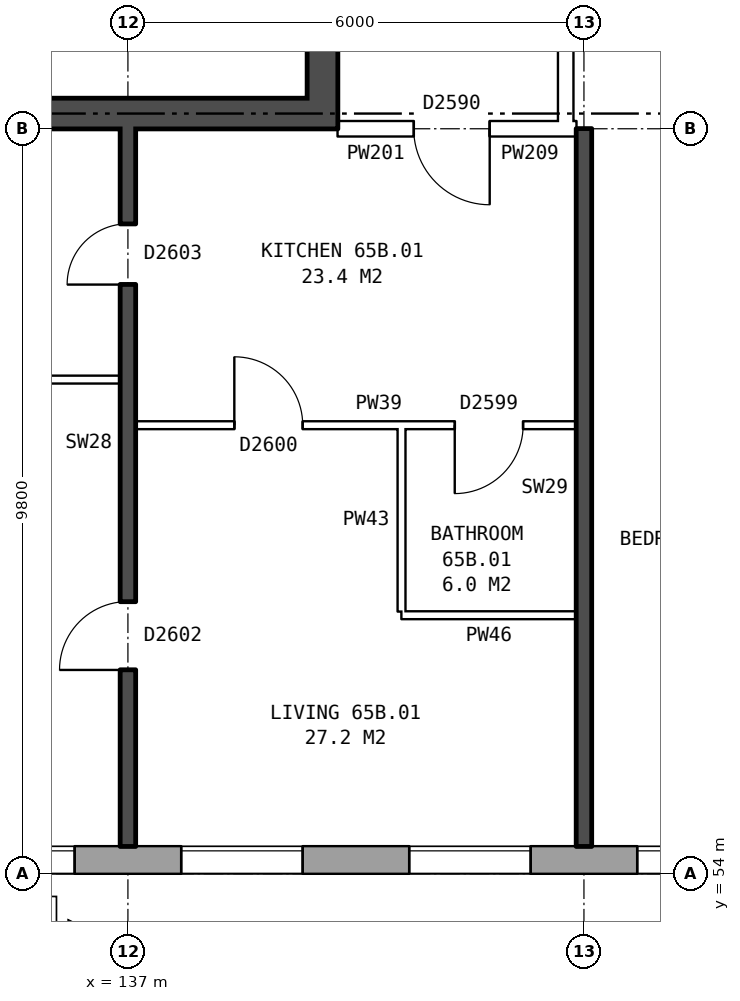
"""IFC4 building model, lengths in metres.
Left out: names, types, materials, properties, quantities, classifications, styles, units other than length and angle.
Written with IfcOpenShell. Run it as: python <this file> out.ifc"""

import sys

from ifc_helpers import new_model, si_unit, direction, frame, frame_2d, origin, place, context, subcontext, project, spatial, rectangle, extrude, element, fill, save


model = new_model("IFC4")
c1 = context("Model", 3, precision=1e-05, world=origin(), true_north=direction((0.0, 1.0)))
c2 = subcontext(c1, "Body", "Model", "MODEL_VIEW")
j1 = project(units=[si_unit("LENGTHUNIT", "METRE"), si_unit("PLANEANGLEUNIT", "RADIAN")], contexts=[c1])
p1 = place(None, origin())
s1 = spatial("IfcSite", under=j1, at=p1, CompositionType="ELEMENT")
p2 = place(p1, origin())
s2 = spatial("IfcBuilding", under=s1, at=p2, CompositionType="ELEMENT")
p3 = place(p2, frame((0.0, 0.0, 230.7)))
s3 = spatial("IfcBuildingStorey", under=s2, at=p3, CompositionType="ELEMENT", Elevation=230.7)
p4 = place(p3, frame((132.05, 54.18, 0.0), z_axis=(0.0, 0.0, 1.0), x_axis=(1.0, 0.0, 0.0)))
e1 = element("IfcWall", 1, at=p4, inside=s3, PredefinedType="STANDARD", context=c2, shape_type="SweptSolid", body=[
    extrude(rectangle(XDim=33.875, YDim=0.36, at=frame_2d((16.938, 0.0))), origin(), (0.0, 0.0, 1.0), 2.85),
])
p5 = place(p4, frame((2.65, 0.0, 0.8)))
e2 = element("IfcOpeningElement", 2, at=p5, cuts=e1, PredefinedType="OPENING", context=c2, shape_type="SweptSolid", body=[
    extrude(rectangle(XDim=1.6, YDim=1.8, at=frame_2d((0.8, 0.9))), frame((0.0, 0.19, 0.0), z_axis=(0.0, -1.0, 0.0), x_axis=(1.0, 0.0, 0.0)), (0.0, 0.0, 1.0), 0.38),
])
p6 = place(p4, frame((5.65, 0.0, 0.8)))
e3 = element("IfcOpeningElement", 3, at=p6, cuts=e1, PredefinedType="OPENING", context=c2, shape_type="SweptSolid", body=[
    extrude(rectangle(XDim=1.6, YDim=1.8, at=frame_2d((0.8, 0.9))), frame((0.0, 0.19, 0.0), z_axis=(0.0, -1.0, 0.0), x_axis=(1.0, 0.0, 0.0)), (0.0, 0.0, 1.0), 0.38),
])
p7 = place(p4, frame((8.65, 0.0, 0.8)))
e4 = element("IfcOpeningElement", 4, at=p7, cuts=e1, PredefinedType="OPENING", context=c2, shape_type="SweptSolid", body=[
    extrude(rectangle(XDim=1.6, YDim=1.8, at=frame_2d((0.8, 0.9))), frame((0.0, 0.19, 0.0), z_axis=(0.0, -1.0, 0.0), x_axis=(1.0, 0.0, 0.0)), (0.0, 0.0, 1.0), 0.38),
])
p8 = place(p4, frame((11.65, 0.0, 0.8)))
e5 = element("IfcOpeningElement", 5, at=p8, cuts=e1, PredefinedType="OPENING", context=c2, shape_type="SweptSolid", body=[
    extrude(rectangle(XDim=1.6, YDim=1.8, at=frame_2d((0.8, 0.9))), frame((0.0, 0.19, 0.0), z_axis=(0.0, -1.0, 0.0), x_axis=(1.0, 0.0, 0.0)), (0.0, 0.0, 1.0), 0.38),
])
p9 = place(p4, frame((14.1, 0.0, 1.25)))
e6 = element("IfcOpeningElement", 6, at=p9, cuts=e1, PredefinedType="OPENING", context=c2, shape_type="SweptSolid", body=[
    extrude(rectangle(XDim=0.8, YDim=1.2, at=frame_2d((0.4, 0.6))), frame((0.0, 0.19, 0.0), z_axis=(0.0, -1.0, 0.0), x_axis=(1.0, 0.0, 0.0)), (0.0, 0.0, 1.0), 0.38),
])
p10 = place(p4, frame((17.65, 0.0, 0.8)))
e7 = element("IfcOpeningElement", 7, at=p10, cuts=e1, PredefinedType="OPENING", context=c2, shape_type="SweptSolid", body=[
    extrude(rectangle(XDim=1.6, YDim=1.8, at=frame_2d((0.8, 0.9))), frame((0.0, 0.19, 0.0), z_axis=(0.0, -1.0, 0.0), x_axis=(1.0, 0.0, 0.0)), (0.0, 0.0, 1.0), 0.38),
])
p11 = place(p4, frame((21.25, 0.0, 0.8)))
e8 = element("IfcOpeningElement", 8, at=p11, cuts=e1, PredefinedType="OPENING", context=c2, shape_type="SweptSolid", body=[
    extrude(rectangle(XDim=1.4, YDim=1.8, at=frame_2d((0.7, 0.9))), frame((0.0, 0.19, 0.0), z_axis=(0.0, -1.0, 0.0), x_axis=(1.0, 0.0, 0.0)), (0.0, 0.0, 1.0), 0.38),
])
p12 = place(p4, frame((23.65, 0.0, 0.8)))
e9 = element("IfcOpeningElement", 9, at=p12, cuts=e1, PredefinedType="OPENING", context=c2, shape_type="SweptSolid", body=[
    extrude(rectangle(XDim=1.6, YDim=1.8, at=frame_2d((0.8, 0.9))), frame((0.0, 0.19, 0.0), z_axis=(0.0, -1.0, 0.0), x_axis=(1.0, 0.0, 0.0)), (0.0, 0.0, 1.0), 0.38),
])
p13 = place(p4, frame((26.65, 0.0, 0.8)))
e10 = element("IfcOpeningElement", 10, at=p13, cuts=e1, PredefinedType="OPENING", context=c2, shape_type="SweptSolid", body=[
    extrude(rectangle(XDim=1.6, YDim=1.8, at=frame_2d((0.8, 0.9))), frame((0.0, 0.19, 0.0), z_axis=(0.0, -1.0, 0.0), x_axis=(1.0, 0.0, 0.0)), (0.0, 0.0, 1.0), 0.38),
])
p14 = place(p4, frame((29.65, 0.0, 0.8)))
e11 = element("IfcOpeningElement", 11, at=p14, cuts=e1, PredefinedType="OPENING", context=c2, shape_type="SweptSolid", body=[
    extrude(rectangle(XDim=1.6, YDim=1.8, at=frame_2d((0.8, 0.9))), frame((0.0, 0.19, 0.0), z_axis=(0.0, -1.0, 0.0), x_axis=(1.0, 0.0, 0.0)), (0.0, 0.0, 1.0), 0.38),
])
p15 = place(p4, frame((16.1, 0.0, 0.15)))
e12 = element("IfcOpeningElement", 12, at=p15, cuts=e1, PredefinedType="OPENING", context=c2, shape_type="SweptSolid", body=[
    extrude(rectangle(XDim=0.6, YDim=1.2, at=frame_2d((0.3, 0.6))), frame((0.0, 0.19, 0.0), z_axis=(0.0, -1.0, 0.0), x_axis=(1.0, 0.0, 0.0)), (0.0, 0.0, 1.0), 0.38),
])
p16 = place(p3, frame((139.56, 63.8, 0.0), z_axis=(0.0, 0.0, 1.0), x_axis=(0.0, 1.0, 0.0)))
e13 = element("IfcWall", 13, at=p16, inside=s3, PredefinedType="SHEAR", context=c2, shape_type="SweptSolid", body=[
    extrude(rectangle(XDim=12.4, YDim=0.4, at=frame_2d((6.2, 0.0))), origin(), (0.0, 0.0, 1.0), 2.85),
])
p17 = place(p16, frame((1.325, 0.0, 0.0)))
e14 = element("IfcOpeningElement", 14, at=p17, cuts=e13, PredefinedType="OPENING", context=c2, shape_type="SweptSolid", body=[
    extrude(rectangle(XDim=1.1, YDim=2.1, at=frame_2d((0.55, 1.05))), frame((0.0, 0.21, 0.0), z_axis=(0.0, -1.0, 0.0), x_axis=(1.0, 0.0, 0.0)), (0.0, 0.0, 1.0), 0.42),
])
p18 = place(p16, frame((3.6, 0.0, 0.0)))
e15 = element("IfcOpeningElement", 15, at=p18, cuts=e13, PredefinedType="OPENING", context=c2, shape_type="SweptSolid", body=[
    extrude(rectangle(XDim=1.1, YDim=2.1, at=frame_2d((0.55, 1.05))), frame((0.0, 0.21, 0.0), z_axis=(0.0, -1.0, 0.0), x_axis=(1.0, 0.0, 0.0)), (0.0, 0.0, 1.0), 0.42),
])
p19 = place(p16, frame((5.8, 0.0, 0.0)))
e16 = element("IfcOpeningElement", 16, at=p19, cuts=e13, PredefinedType="OPENING", context=c2, shape_type="SweptSolid", body=[
    extrude(rectangle(XDim=1.1, YDim=2.1, at=frame_2d((0.55, 1.05))), frame((0.0, 0.21, 0.0), z_axis=(0.0, -1.0, 0.0), x_axis=(1.0, 0.0, 0.0)), (0.0, 0.0, 1.0), 0.42),
])
p20 = place(p16, frame((9.9, 0.0, 0.0)))
e17 = element("IfcOpeningElement", 17, at=p20, cuts=e13, PredefinedType="OPENING", context=c2, shape_type="SweptSolid", body=[
    extrude(rectangle(XDim=1.1, YDim=2.1, at=frame_2d((0.55, 1.05))), frame((0.0, 0.21, 0.0), z_axis=(0.0, -1.0, 0.0), x_axis=(1.0, 0.0, 0.0)), (0.0, 0.0, 1.0), 0.42),
])
p21 = place(p16, frame((8.125, 0.0, 0.0)))
e18 = element("IfcOpeningElement", 18, at=p21, cuts=e13, PredefinedType="OPENING", context=c2, shape_type="SweptSolid", body=[
    extrude(rectangle(XDim=0.85, YDim=2.1, at=frame_2d((0.425, 1.05))), frame((0.0, 0.21, 0.0), z_axis=(0.0, -1.0, 0.0), x_axis=(1.0, 0.0, 0.0)), (0.0, 0.0, 1.0), 0.42),
])
p22 = place(p3, frame((139.36, 64.0, 0.0), z_axis=(0.0, 0.0, 1.0), x_axis=(-1.0, 0.0, 0.0)))
e19 = element("IfcWall", 19, at=p22, inside=s3, PredefinedType="SHEAR", context=c2, shape_type="SweptSolid", body=[
    extrude(rectangle(XDim=7.6, YDim=0.4, at=frame_2d((3.8, 0.0))), origin(), (0.0, 0.0, 1.0), 2.85),
])
p23 = place(p3, frame((142.76, 63.9, 0.0), z_axis=(0.0, 0.0, 1.0), x_axis=(0.0, 1.0, 0.0)))
e20 = element("IfcWall", 20, at=p23, inside=s3, PredefinedType="PARTITIONING", context=c2, shape_type="SweptSolid", body=[
    extrude(rectangle(XDim=12.2, YDim=0.2, at=frame_2d((6.1, 0.0))), origin(), (0.0, 0.0, 1.0), 2.85),
])
p24 = place(p23, frame((5.1, 0.0, 0.0)))
e21 = element("IfcOpeningElement", 21, at=p24, cuts=e20, PredefinedType="OPENING", context=c2, shape_type="SweptSolid", body=[
    extrude(rectangle(XDim=2.0, YDim=2.1, at=frame_2d((1.0, 1.05))), frame((0.0, 0.11, 0.0), z_axis=(0.0, -1.0, 0.0), x_axis=(1.0, 0.0, 0.0)), (0.0, 0.0, 1.0), 0.22),
])
p25 = place(p3, frame((140.6, 57.4, 0.0), z_axis=(0.0, 0.0, 1.0), x_axis=(1.0, 0.0, 0.0)))
e22 = element("IfcWall", 22, at=p25, inside=s3, PredefinedType="PARTITIONING", context=c2, shape_type="SweptSolid", body=[
    extrude(rectangle(XDim=2.3, YDim=0.1, at=frame_2d((1.15, 0.0))), origin(), (0.0, 0.0, 1.0), 2.85),
])
p26 = place(p3, frame((137.1, 59.9, 0.0), z_axis=(0.0, 0.0, 1.0), x_axis=(1.0, 0.0, 0.0)))
e23 = element("IfcWall", 23, at=p26, inside=s3, PredefinedType="PARTITIONING", context=c2, shape_type="SweptSolid", body=[
    extrude(rectangle(XDim=5.8, YDim=0.1, at=frame_2d((2.9, 0.0))), origin(), (0.0, 0.0, 1.0), 2.85),
])
p27 = place(p26, frame((1.3, 0.0, 0.0)))
e24 = element("IfcOpeningElement", 24, at=p27, cuts=e23, PredefinedType="OPENING", context=c2, shape_type="SweptSolid", body=[
    extrude(rectangle(XDim=0.9, YDim=2.1, at=frame_2d((0.45, 1.05))), frame((0.0, 0.06, 0.0), z_axis=(0.0, -1.0, 0.0), x_axis=(1.0, 0.0, 0.0)), (0.0, 0.0, 1.0), 0.12),
])
p28 = place(p26, frame((4.2, 0.0, 0.0)))
e25 = element("IfcOpeningElement", 25, at=p28, cuts=e23, PredefinedType="OPENING", context=c2, shape_type="SweptSolid", body=[
    extrude(rectangle(XDim=0.9, YDim=2.1, at=frame_2d((0.45, 1.05))), frame((0.0, 0.06, 0.0), z_axis=(0.0, -1.0, 0.0), x_axis=(1.0, 0.0, 0.0)), (0.0, 0.0, 1.0), 0.12),
])
p29 = place(p3, frame((131.1, 60.5, 0.0), z_axis=(0.0, 0.0, 1.0), x_axis=(1.0, 0.0, 0.0)))
e26 = element("IfcWall", 26, at=p29, inside=s3, PredefinedType="PARTITIONING", context=c2, shape_type="SweptSolid", body=[
    extrude(rectangle(XDim=5.8, YDim=0.1, at=frame_2d((2.9, 0.0))), origin(), (0.0, 0.0, 1.0), 2.85),
])
p30 = place(p3, frame((139.76, 63.8, 0.0), z_axis=(0.0, 0.0, 1.0), x_axis=(1.0, 0.0, 0.0)))
e27 = element("IfcWall", 27, at=p30, inside=s3, PredefinedType="PARTITIONING", context=c2, shape_type="SweptSolid", body=[
    extrude(rectangle(XDim=3.0, YDim=0.2, at=frame_2d((1.5, 0.0))), origin(), (0.0, 0.0, 1.0), 2.85),
])
p31 = place(p30, frame((1.0, 0.0, 0.0)))
e28 = element("IfcOpeningElement", 28, at=p31, cuts=e27, PredefinedType="OPENING", context=c2, shape_type="SweptSolid", body=[
    extrude(rectangle(XDim=1.0, YDim=2.1, at=frame_2d((0.5, 1.05))), frame((0.0, 0.11, 0.0), z_axis=(0.0, -1.0, 0.0), x_axis=(1.0, 0.0, 0.0)), (0.0, 0.0, 1.0), 0.22),
])
p32 = place(p3, frame((142.76, 63.8, 0.0), z_axis=(0.0, 0.0, 1.0), x_axis=(1.0, 0.0, 0.0)))
e29 = element("IfcWall", 29, at=p32, inside=s3, PredefinedType="PARTITIONING", context=c2, shape_type="SweptSolid", body=[
    extrude(rectangle(XDim=0.14, YDim=0.2, at=frame_2d((0.07, 0.0))), origin(), (0.0, 0.0, 1.0), 2.85),
])
p33 = place(p3, frame((137.0, 54.36, 0.0), z_axis=(0.0, 0.0, 1.0), x_axis=(0.0, 1.0, 0.0)))
e30 = element("IfcWall", 30, at=p33, inside=s3, PredefinedType="SOLIDWALL", context=c2, shape_type="SweptSolid", body=[
    extrude(rectangle(XDim=9.44, YDim=0.2, at=frame_2d((4.72, 0.0))), origin(), (0.0, 0.0, 1.0), 2.85),
])
p34 = place(p33, frame((2.32, 0.0, 0.0)))
e31 = element("IfcOpeningElement", 31, at=p34, cuts=e30, PredefinedType="OPENING", context=c2, shape_type="SweptSolid", body=[
    extrude(rectangle(XDim=0.9, YDim=2.1, at=frame_2d((0.45, 1.05))), frame((0.0, 0.11, 0.0), z_axis=(0.0, -1.0, 0.0), x_axis=(1.0, 0.0, 0.0)), (0.0, 0.0, 1.0), 0.22),
])
p35 = place(p33, frame((7.39, 0.0, 0.0)))
e32 = element("IfcOpeningElement", 32, at=p35, cuts=e30, PredefinedType="OPENING", context=c2, shape_type="SweptSolid", body=[
    extrude(rectangle(XDim=0.8, YDim=2.1, at=frame_2d((0.4, 1.05))), frame((0.0, 0.11, 0.0), z_axis=(0.0, -1.0, 0.0), x_axis=(1.0, 0.0, 0.0)), (0.0, 0.0, 1.0), 0.22),
])
p36 = place(p3, frame((140.6, 57.45, 0.0), z_axis=(0.0, 0.0, 1.0), x_axis=(0.0, 1.0, 0.0)))
e33 = element("IfcWall", 33, at=p36, inside=s3, PredefinedType="PARTITIONING", context=c2, shape_type="SweptSolid", body=[
    extrude(rectangle(XDim=2.4, YDim=0.1, at=frame_2d((1.2, 0.0))), origin(), (0.0, 0.0, 1.0), 2.85),
])
p37 = place(p3, frame((143.0, 54.36, 0.0), z_axis=(0.0, 0.0, 1.0), x_axis=(0.0, 1.0, 0.0)))
e34 = element("IfcWall", 34, at=p37, inside=s3, PredefinedType="SOLIDWALL", context=c2, shape_type="SweptSolid", body=[
    extrude(rectangle(XDim=9.44, YDim=0.2, at=frame_2d((4.72, 0.0))), origin(), (0.0, 0.0, 1.0), 2.85),
])
p38 = place(p5, origin())
e35 = element("IfcWindow", 35, at=p38, inside=s3, PartitioningType="SINGLE_PANEL", PredefinedType="WINDOW", context=c2, shape_type="SweptSolid", body=[
    extrude(rectangle(XDim=1.6, YDim=1.8, at=frame_2d((0.8, 0.9))), frame((0.0, 0.15, 0.0), z_axis=(0.0, -1.0, 0.0), x_axis=(1.0, 0.0, 0.0)), (0.0, 0.0, 1.0), 0.06),
])
fill(e2, e35)
p39 = place(p6, origin())
e36 = element("IfcWindow", 36, at=p39, inside=s3, PartitioningType="SINGLE_PANEL", PredefinedType="WINDOW", context=c2, shape_type="SweptSolid", body=[
    extrude(rectangle(XDim=1.6, YDim=1.8, at=frame_2d((0.8, 0.9))), frame((0.0, 0.15, 0.0), z_axis=(0.0, -1.0, 0.0), x_axis=(1.0, 0.0, 0.0)), (0.0, 0.0, 1.0), 0.06),
])
fill(e3, e36)
p40 = place(p7, origin())
e37 = element("IfcWindow", 37, at=p40, inside=s3, PartitioningType="SINGLE_PANEL", PredefinedType="WINDOW", context=c2, shape_type="SweptSolid", body=[
    extrude(rectangle(XDim=1.6, YDim=1.8, at=frame_2d((0.8, 0.9))), frame((0.0, 0.15, 0.0), z_axis=(0.0, -1.0, 0.0), x_axis=(1.0, 0.0, 0.0)), (0.0, 0.0, 1.0), 0.06),
])
fill(e4, e37)
p41 = place(p8, origin())
e38 = element("IfcWindow", 38, at=p41, inside=s3, PartitioningType="SINGLE_PANEL", PredefinedType="WINDOW", context=c2, shape_type="SweptSolid", body=[
    extrude(rectangle(XDim=1.6, YDim=1.8, at=frame_2d((0.8, 0.9))), frame((0.0, 0.15, 0.0), z_axis=(0.0, -1.0, 0.0), x_axis=(1.0, 0.0, 0.0)), (0.0, 0.0, 1.0), 0.06),
])
fill(e5, e38)
p42 = place(p34, origin())
e39 = element("IfcDoor", 39, at=p42, inside=s3, OperationType="SINGLE_SWING_LEFT", PredefinedType="DOOR", context=c2, shape_type="SweptSolid", body=[
    extrude(rectangle(XDim=0.9, YDim=2.1, at=frame_2d((0.45, 1.05))), frame((0.0, 0.025, 0.0), z_axis=(0.0, -1.0, 0.0), x_axis=(1.0, 0.0, 0.0)), (0.0, 0.0, 1.0), 0.05),
])
fill(e31, e39)
p43 = place(p31, frame((1.0, 0.0, 0.0), z_axis=(0.0, 0.0, 1.0), x_axis=(-1.0, 0.0, 0.0)))
e40 = element("IfcDoor", 40, at=p43, inside=s3, OperationType="SINGLE_SWING_LEFT", PredefinedType="DOOR", context=c2, shape_type="SweptSolid", body=[
    extrude(rectangle(XDim=1.0, YDim=2.1, at=frame_2d((0.5, 1.05))), frame((0.0, 0.025, 0.0), z_axis=(0.0, -1.0, 0.0), x_axis=(1.0, 0.0, 0.0)), (0.0, 0.0, 1.0), 0.05),
])
fill(e28, e40)
p44 = place(p27, origin())
e41 = element("IfcDoor", 41, at=p44, inside=s3, OperationType="SINGLE_SWING_LEFT", PredefinedType="DOOR", context=c2, shape_type="SweptSolid", body=[
    extrude(rectangle(XDim=0.9, YDim=2.1, at=frame_2d((0.45, 1.05))), frame((0.0, 0.025, 0.0), z_axis=(0.0, -1.0, 0.0), x_axis=(1.0, 0.0, 0.0)), (0.0, 0.0, 1.0), 0.05),
])
fill(e24, e41)
p45 = place(p35, origin())
e42 = element("IfcDoor", 42, at=p45, inside=s3, OperationType="SINGLE_SWING_LEFT", PredefinedType="DOOR", context=c2, shape_type="SweptSolid", body=[
    extrude(rectangle(XDim=0.8, YDim=2.1, at=frame_2d((0.4, 1.05))), frame((0.0, 0.025, 0.0), z_axis=(0.0, -1.0, 0.0), x_axis=(1.0, 0.0, 0.0)), (0.0, 0.0, 1.0), 0.05),
])
fill(e32, e42)
p46 = place(p28, frame((0.9, 0.0, 0.0), z_axis=(0.0, 0.0, 1.0), x_axis=(-1.0, 0.0, 0.0)))
e43 = element("IfcDoor", 43, at=p46, inside=s3, OperationType="SINGLE_SWING_RIGHT", PredefinedType="DOOR", context=c2, shape_type="SweptSolid", body=[
    extrude(rectangle(XDim=0.9, YDim=2.1, at=frame_2d((0.45, 1.05))), frame((0.0, 0.025, 0.0), z_axis=(0.0, -1.0, 0.0), x_axis=(1.0, 0.0, 0.0)), (0.0, 0.0, 1.0), 0.05),
])
fill(e25, e43)
save(model, sys.argv[1])
